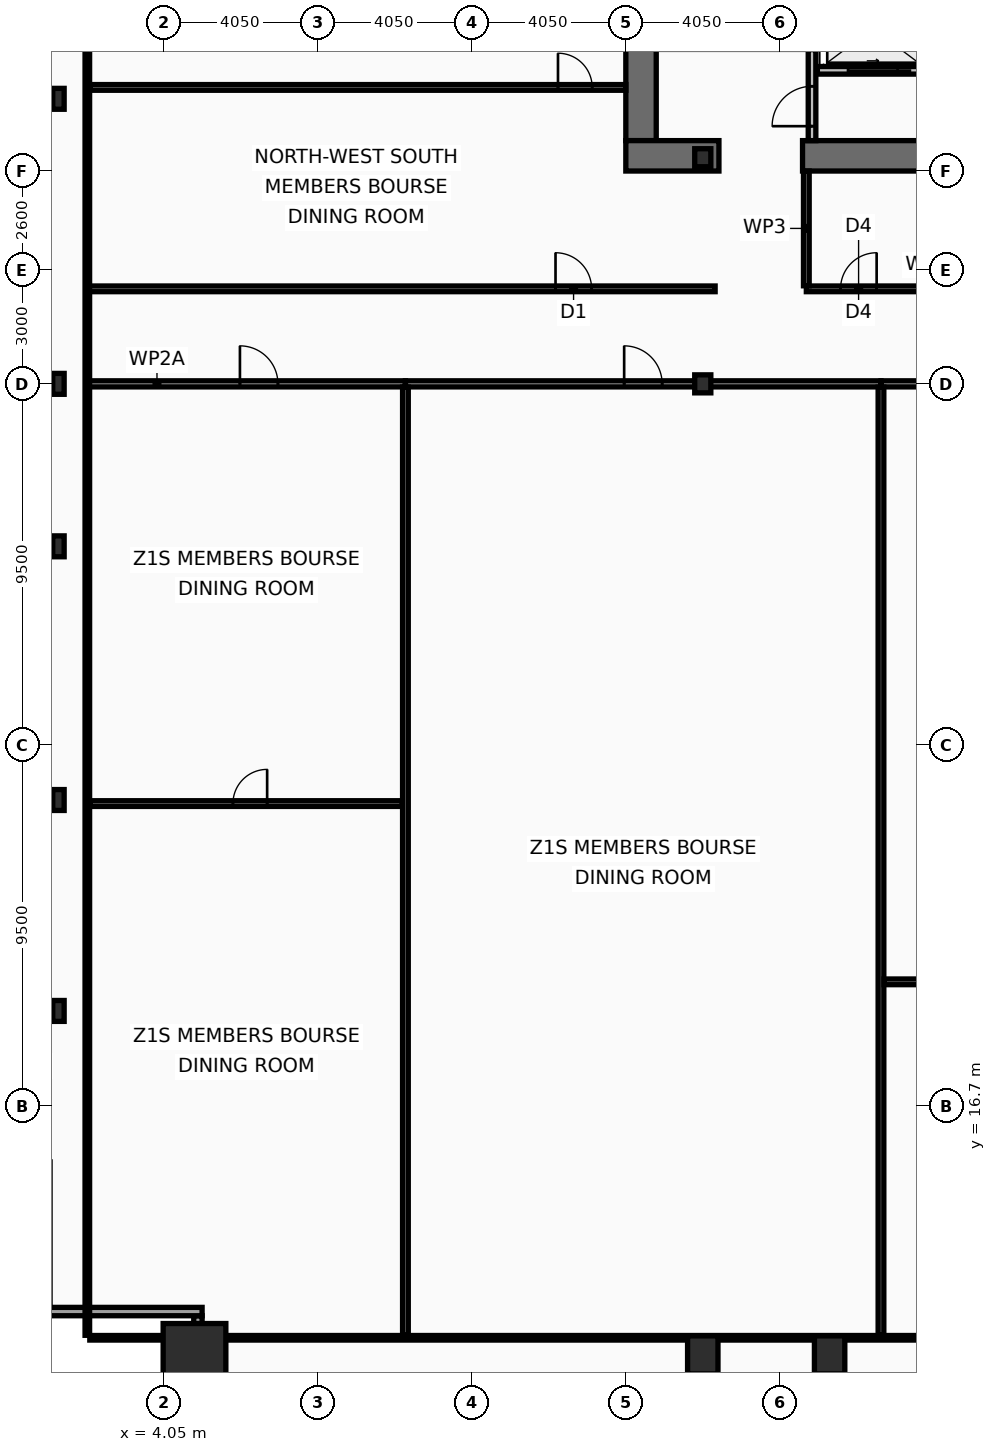
"""IFC4 building model, lengths in metres.
Left out: names, types, materials, properties, quantities, classifications, styles, units other than length and angle.
Written with IfcOpenShell. Run it as: python <this file> out.ifc"""

import sys

from ifc_helpers import new_model, si_unit, direction, frame, frame_2d, origin, origin_2d, place, context, subcontext, project, spatial, rectangle, hollow_rectangle, i_section, extrude, element, fill, save


model = new_model("IFC4")
c1 = context("Model", 3, precision=1e-05, world=origin(), true_north=direction((0.0, 1.0)))
c2 = subcontext(c1, "Body", "Model", "MODEL_VIEW")
j1 = project(units=[si_unit("LENGTHUNIT", "METRE"), si_unit("PLANEANGLEUNIT", "RADIAN")], contexts=[c1])
p1 = place(None, origin())
s1 = spatial("IfcSite", under=j1, at=p1, CompositionType="ELEMENT")
p2 = place(p1, origin())
s2 = spatial("IfcBuilding", under=s1, at=p2, CompositionType="ELEMENT")
p3 = place(p2, frame((0.0, 0.0, 45.8)))
s3 = spatial("IfcBuildingStorey", under=s2, at=p3, CompositionType="ELEMENT", Elevation=45.8)
p4 = place(p3, frame((16.6, 42.1, 0.0), z_axis=(0.0, 0.0, 1.0), x_axis=(0.0, 1.0, 0.0)))
e1 = element("IfcWall", 1, at=p4, inside=s3, PredefinedType="SHEAR", context=c2, shape_type="SweptSolid", body=[
    extrude(rectangle(XDim=10.8, YDim=0.8, at=frame_2d((5.4, 0.0))), origin(), (0.0, 0.0, 1.0), 3.82),
])
p5 = place(p3, frame((18.65, 41.7, 0.0), z_axis=(0.0, 0.0, 1.0), x_axis=(-1.0, 0.0, 0.0)))
e2 = element("IfcWall", 2, at=p5, inside=s3, PredefinedType="SHEAR", context=c2, shape_type="SweptSolid", body=[
    extrude(rectangle(XDim=2.45, YDim=0.8, at=frame_2d((1.225, 0.0))), origin(), (0.0, 0.0, 1.0), 3.82),
])
p6 = place(p3, frame((32.3, 41.7, 0.0), z_axis=(0.0, 0.0, 1.0), x_axis=(-1.0, 0.0, 0.0)))
e3 = element("IfcWall", 3, at=p6, inside=s3, PredefinedType="SHEAR", context=c2, shape_type="SweptSolid", body=[
    extrude(rectangle(XDim=11.45, YDim=0.8, at=frame_2d((5.725, 0.0))), origin(), (0.0, 0.0, 1.0), 3.82),
])
p7 = place(p3, frame((4.85, 10.15, 0.0), z_axis=(0.0, 0.0, 1.0), x_axis=(1.0, 0.0, 0.0)))
e4 = element("IfcColumn", 4, at=p7, inside=s3, PredefinedType="COLUMN", context=c2, shape_type="SweptSolid", body=[
    extrude(hollow_rectangle(XDim=1.65, YDim=1.65, WallThickness=0.075, at=origin_2d()), origin(), (0.0, 0.0, 1.0), 4.0),
])
for number, where, z_axis, x_axis in (
    (5, (18.225, 10.15, 0.0), (0.0, 0.0, 1.0), (1.0, 0.0, 0.0)),
    (6, (21.562, 10.15, 0.0), (0.0, 0.0, 1.0), (1.0, 0.0, 0.0)),
):
    element("IfcColumn", number, at=place(p3, frame(where, z_axis=z_axis, x_axis=x_axis)), inside=s3, PredefinedType="COLUMN", context=c2, shape_type="SweptSolid", body=[
        extrude(hollow_rectangle(XDim=0.8, YDim=1.0, WallThickness=0.055, at=origin_2d()), origin(), (0.0, 0.0, 1.0), 4.0),
    ])
for number, where, z_axis, x_axis in (
    (7, (1.27, 19.2, 0.0), (0.0, 0.0, 1.0), (1.0, 0.0, 0.0)),
    (8, (1.27, 24.75, 0.0), (0.0, 0.0, 1.0), (1.0, 0.0, 0.0)),
    (9, (1.27, 31.425, 0.0), (0.0, 0.0, 1.0), (1.0, 0.0, 0.0)),
    (10, (1.27, 35.7, 0.0), (0.0, 0.0, 1.0), (1.0, 0.0, 0.0)),
    (11, (1.27, 43.2, 0.0), (0.0, 0.0, 1.0), (1.0, 0.0, 0.0)),
):
    element("IfcColumn", number, at=place(p3, frame(where, z_axis=z_axis, x_axis=x_axis)), inside=s3, PredefinedType="COLUMN", context=c2, shape_type="SweptSolid", body=[
        extrude(i_section(OverallWidth=0.3, OverallDepth=0.55, WebThickness=0.015, FlangeThickness=0.029, at=origin_2d()), origin(), (0.0, 0.0, 1.0), 4.0),
    ])
for number, where, z_axis, x_axis in (
    (12, (18.225, 35.7, 0.0), (0.0, 0.0, 1.0), (1.0, 0.0, 0.0)),
    (13, (18.225, 41.65, 0.0), (0.0, 0.0, 1.0), (1.0, 0.0, 0.0)),
):
    element("IfcColumn", number, at=place(p3, frame(where, z_axis=z_axis, x_axis=x_axis)), inside=s3, PredefinedType="COLUMN", context=c2, shape_type="SweptSolid", body=[
        extrude(i_section(OverallWidth=0.424, OverallDepth=0.474, WebThickness=0.048, FlangeThickness=0.077, at=origin_2d()), origin(), (0.0, 0.0, 1.0), 4.0),
    ])
p8 = place(p3, frame((4.94, 7.27, 0.0), z_axis=(0.0, 0.0, 1.0), x_axis=(0.0, 1.0, 0.0)))
e14 = element("IfcWall", 14, at=p8, inside=s3, PredefinedType="SOLIDWALL", context=c2, shape_type="SweptSolid", body=[
    extrude(rectangle(XDim=3.91, YDim=0.22, at=frame_2d((1.955, 0.0))), origin(), (0.0, 0.0, 1.0), 3.16),
])
p9 = place(p3, frame((5.05, 11.29, 0.0), z_axis=(0.0, 0.0, 1.0), x_axis=(-1.0, 0.0, 0.0)))
e15 = element("IfcWall", 15, at=p9, inside=s3, PredefinedType="SOLIDWALL", context=c2, shape_type="SweptSolid", body=[
    extrude(rectangle(XDim=4.22, YDim=0.22, at=frame_2d((2.11, 0.0))), origin(), (0.0, 0.0, 1.0), 3.16),
])
p10 = place(p3, frame((24.21, 43.95, 0.0), z_axis=(0.0, 0.0, 1.0), x_axis=(-1.0, 0.0, 0.0)))
e16 = element("IfcWall", 16, at=p10, inside=s3, PredefinedType="PARTITIONING", context=c2, shape_type="SweptSolid", body=[
    extrude(rectangle(XDim=2.97, YDim=0.2, at=frame_2d((1.485, 0.0))), origin(), (0.0, 0.0, 1.0), 3.82),
])
p11 = place(p10, frame((0.86, 0.0, 0.0)))
e17 = element("IfcOpeningElement", 17, at=p11, cuts=e16, PredefinedType="OPENING", context=c2, shape_type="SweptSolid", body=[
    extrude(rectangle(XDim=1.3, YDim=2.18, at=frame_2d((0.65, 1.09))), frame((0.0, 0.11, 0.0), z_axis=(0.0, -1.0, 0.0), x_axis=(1.0, 0.0, 0.0)), (0.0, 0.0, 1.0), 0.22),
])
p12 = place(p3, frame((21.1, 42.1, 0.0), z_axis=(0.0, 0.0, 1.0), x_axis=(0.0, 1.0, 0.0)))
e18 = element("IfcWall", 18, at=p12, inside=s3, PredefinedType="PARTITIONING", context=c2, shape_type="SweptSolid", body=[
    extrude(rectangle(XDim=2.395, YDim=0.2, at=frame_2d((1.198, 0.0))), origin(), (0.0, 0.0, 1.0), 3.82),
])
p13 = place(p12, frame((0.38, 0.0, 0.0)))
e19 = element("IfcOpeningElement", 19, at=p13, cuts=e18, PredefinedType="OPENING", context=c2, shape_type="SweptSolid", body=[
    extrude(rectangle(XDim=1.05, YDim=2.15, at=frame_2d((0.525, 1.075))), frame((0.0, 0.11, 0.0), z_axis=(0.0, -1.0, 0.0), x_axis=(1.0, 0.0, 0.0)), (0.0, 0.0, 1.0), 0.22),
])
p14 = place(p3, frame((20.95, 38.2, 0.0), z_axis=(0.0, 0.0, 1.0), x_axis=(1.0, 0.0, 0.0)))
e20 = element("IfcWall", 20, at=p14, inside=s3, PredefinedType="PARTITIONING", context=c2, shape_type="SweptSolid", body=[
    extrude(rectangle(XDim=4.15, YDim=0.15, at=frame_2d((2.075, 0.0))), origin(), (0.0, 0.0, 1.0), 3.01),
])
p15 = place(p14, frame((0.9, 0.0, 0.0)))
e21 = element("IfcOpeningElement", 21, at=p15, cuts=e20, PredefinedType="OPENING", context=c2, shape_type="SweptSolid", body=[
    extrude(rectangle(XDim=0.95, YDim=2.05, at=frame_2d((0.475, 1.025))), frame((0.0, 0.085, 0.0), z_axis=(0.0, -1.0, 0.0), x_axis=(1.0, 0.0, 0.0)), (0.0, 0.0, 1.0), 0.17),
])
p16 = place(p3, frame((20.95, 38.28, 0.0), z_axis=(0.0, 0.0, 1.0), x_axis=(0.0, 1.0, 0.0)))
e22 = element("IfcWall", 22, at=p16, inside=s3, PredefinedType="PARTITIONING", context=c2, shape_type="SweptSolid", body=[
    extrude(rectangle(XDim=3.02, YDim=0.15, at=frame_2d((1.51, 0.0))), origin(), (0.0, 0.0, 1.0), 3.82),
])
p17 = place(p3, frame((2.03, 38.2, 0.0), z_axis=(0.0, 0.0, 1.0), x_axis=(1.0, 0.0, 0.0)))
e23 = element("IfcWall", 23, at=p17, inside=s3, PredefinedType="PARTITIONING", context=c2, shape_type="SweptSolid", body=[
    extrude(rectangle(XDim=16.52, YDim=0.15, at=frame_2d((8.26, 0.0))), origin(), (0.0, 0.0, 1.0), 3.01),
])
p18 = place(p17, frame((12.32, 0.0, 0.0)))
e24 = element("IfcOpeningElement", 24, at=p18, cuts=e23, PredefinedType="OPENING", context=c2, shape_type="SweptSolid", body=[
    extrude(rectangle(XDim=0.95, YDim=2.05, at=frame_2d((0.475, 1.025))), frame((0.0, 0.085, 0.0), z_axis=(0.0, -1.0, 0.0), x_axis=(1.0, 0.0, 0.0)), (0.0, 0.0, 1.0), 0.17),
])
p19 = place(p3, frame((2.095, 43.5, 0.0), z_axis=(0.0, 0.0, 1.0), x_axis=(1.0, 0.0, 0.0)))
e25 = element("IfcWall", 25, at=p19, inside=s3, PredefinedType="PARTITIONING", context=c2, shape_type="SweptSolid", body=[
    extrude(rectangle(XDim=14.105, YDim=0.15, at=frame_2d((7.052, 0.0))), origin(), (0.0, 0.0, 1.0), 3.01),
])
p20 = place(p19, frame((12.32, 0.0, 0.0)))
e26 = element("IfcOpeningElement", 26, at=p20, cuts=e25, PredefinedType="OPENING", context=c2, shape_type="SweptSolid", body=[
    extrude(rectangle(XDim=0.9, YDim=2.05, at=frame_2d((0.45, 1.025))), frame((0.0, 0.085, 0.0), z_axis=(0.0, -1.0, 0.0), x_axis=(1.0, 0.0, 0.0)), (0.0, 0.0, 1.0), 0.17),
])
p21 = place(p3, frame((2.03, 35.7, 0.0), z_axis=(0.0, 0.0, 1.0), x_axis=(1.0, 0.0, 0.0)))
e27 = element("IfcWall", 27, at=p21, inside=s3, PredefinedType="PARTITIONING", context=c2, shape_type="SweptSolid", body=[
    extrude(rectangle(XDim=8.37, YDim=0.16, at=frame_2d((4.185, 0.0))), origin(), (0.0, 0.0, 1.0), 3.01),
])
p22 = place(p21, frame((4.016, 0.0, 0.0)))
e28 = element("IfcOpeningElement", 28, at=p22, cuts=e27, PredefinedType="OPENING", context=c2, shape_type="SweptSolid", body=[
    extrude(rectangle(XDim=1.0, YDim=2.05, at=frame_2d((0.5, 1.025))), frame((0.0, 0.09, 0.0), z_axis=(0.0, -1.0, 0.0), x_axis=(1.0, 0.0, 0.0)), (0.0, 0.0, 1.0), 0.18),
])
p23 = place(p3, frame((2.095, 24.656, 0.0), z_axis=(0.0, 0.0, 1.0), x_axis=(1.0, 0.0, 0.0)))
e29 = element("IfcWall", 29, at=p23, inside=s3, PredefinedType="PARTITIONING", context=c2, shape_type="SweptSolid", body=[
    extrude(rectangle(XDim=8.225, YDim=0.15, at=frame_2d((4.113, 0.0))), origin(), (0.0, 0.0, 1.0), 3.82),
])
p24 = place(p23, frame((3.767, 0.0, 0.0)))
e30 = element("IfcOpeningElement", 30, at=p24, cuts=e29, PredefinedType="OPENING", context=c2, shape_type="SweptSolid", body=[
    extrude(rectangle(XDim=0.9, YDim=2.05, at=frame_2d((0.45, 1.025))), frame((0.0, 0.085, 0.0), z_axis=(0.0, -1.0, 0.0), x_axis=(1.0, 0.0, 0.0)), (0.0, 0.0, 1.0), 0.17),
])
p25 = place(p3, frame((10.4, 35.7, 0.0), z_axis=(0.0, 0.0, 1.0), x_axis=(1.0, 0.0, 0.0)))
e31 = element("IfcWall", 31, at=p25, inside=s3, PredefinedType="PARTITIONING", context=c2, shape_type="SweptSolid", body=[
    extrude(rectangle(XDim=12.514, YDim=0.16, at=frame_2d((6.257, 0.0))), origin(), (0.0, 0.0, 1.0), 3.01),
])
p26 = place(p25, frame((5.756, 0.0, 0.0)))
e32 = element("IfcOpeningElement", 32, at=p26, cuts=e31, PredefinedType="OPENING", context=c2, shape_type="SweptSolid", body=[
    extrude(rectangle(XDim=1.0, YDim=2.05, at=frame_2d((0.5, 1.025))), frame((0.0, 0.09, 0.0), z_axis=(0.0, -1.0, 0.0), x_axis=(1.0, 0.0, 0.0)), (0.0, 0.0, 1.0), 0.18),
])
p27 = place(p3, frame((10.4, 10.665, 0.0), z_axis=(0.0, 0.0, 1.0), x_axis=(0.0, 1.0, 0.0)))
e33 = element("IfcWall", 33, at=p27, inside=s3, PredefinedType="PARTITIONING", context=c2, shape_type="SweptSolid", body=[
    extrude(rectangle(XDim=24.95, YDim=0.15, at=frame_2d((12.475, 0.0))), origin(), (0.0, 0.0, 1.0), 3.01),
])
p28 = place(p3, frame((22.914, 35.7, 0.0), z_axis=(0.0, 0.0, 1.0), x_axis=(1.0, 0.0, 0.0)))
e34 = element("IfcWall", 34, at=p28, inside=s3, PredefinedType="PARTITIONING", context=c2, shape_type="SweptSolid", body=[
    extrude(rectangle(XDim=12.681, YDim=0.16, at=frame_2d((6.34, 0.0))), origin(), (0.0, 0.0, 1.0), 3.01),
])
p29 = place(p28, frame((5.826, 0.0, 0.0)))
e35 = element("IfcOpeningElement", 35, at=p29, cuts=e34, PredefinedType="OPENING", context=c2, shape_type="SweptSolid", body=[
    extrude(rectangle(XDim=1.0, YDim=2.05, at=frame_2d((0.5, 1.025))), frame((0.0, 0.09, 0.0), z_axis=(0.0, -1.0, 0.0), x_axis=(1.0, 0.0, 0.0)), (0.0, 0.0, 1.0), 0.18),
])
p30 = place(p3, frame((22.914, 10.665, 0.0), z_axis=(0.0, 0.0, 1.0), x_axis=(0.0, 1.0, 0.0)))
e36 = element("IfcWall", 36, at=p30, inside=s3, PredefinedType="PARTITIONING", context=c2, shape_type="SweptSolid", body=[
    extrude(rectangle(XDim=24.95, YDim=0.15, at=frame_2d((12.475, 0.0))), origin(), (0.0, 0.0, 1.0), 3.21),
])
p31 = place(p3, frame((22.994, 19.966, 0.0), z_axis=(0.0, 0.0, 1.0), x_axis=(1.0, 0.0, 0.0)))
e37 = element("IfcWall", 37, at=p31, inside=s3, PredefinedType="PARTITIONING", context=c2, shape_type="SweptSolid", body=[
    extrude(rectangle(XDim=12.521, YDim=0.15, at=frame_2d((6.26, 0.0))), origin(), (0.0, 0.0, 1.0), 3.01),
])
p32 = place(p31, frame((5.706, 0.0, 0.0)))
e38 = element("IfcOpeningElement", 38, at=p32, cuts=e37, PredefinedType="OPENING", context=c2, shape_type="SweptSolid", body=[
    extrude(rectangle(XDim=0.9, YDim=2.05, at=frame_2d((0.45, 1.025))), frame((0.0, 0.085, 0.0), z_axis=(0.0, -1.0, 0.0), x_axis=(1.0, 0.0, 0.0)), (0.0, 0.0, 1.0), 0.17),
])
p33 = place(p3, frame((2.03, 10.665, 0.0), z_axis=(0.0, 0.0, 1.0), x_axis=(0.0, 1.0, 0.0)))
e39 = element("IfcWall", 39, at=p33, inside=s3, PredefinedType="PARTITIONING", context=c2, shape_type="SweptSolid", body=[
    extrude(rectangle(XDim=42.11, YDim=0.12, at=frame_2d((21.055, 0.0))), origin(), (0.0, 0.0, 1.0), 3.01),
])
p34 = place(p3, frame((2.095, 10.6, 0.0), z_axis=(0.0, 0.0, 1.0), x_axis=(1.0, 0.0, 0.0)))
e40 = element("IfcWall", 40, at=p34, inside=s3, PredefinedType="PARTITIONING", context=c2, shape_type="SweptSolid", body=[
    extrude(rectangle(XDim=68.71, YDim=0.12, at=frame_2d((34.355, 0.0))), origin(), (0.0, 0.0, 1.0), 3.01),
])
p35 = place(p11, origin())
e41 = element("IfcDoor", 41, at=p35, inside=s3, OperationType="SLIDING_TO_LEFT", PredefinedType="DOOR", context=c2, shape_type="SweptSolid", body=[
    extrude(rectangle(XDim=1.3, YDim=2.18, at=frame_2d((0.65, 1.09))), frame((0.0, 0.025, 0.0), z_axis=(0.0, -1.0, 0.0), x_axis=(1.0, 0.0, 0.0)), (0.0, 0.0, 1.0), 0.05),
])
fill(e17, e41)
p36 = place(p13, origin())
e42 = element("IfcDoor", 42, at=p36, inside=s3, OperationType="SINGLE_SWING_LEFT", PredefinedType="DOOR", context=c2, shape_type="SweptSolid", body=[
    extrude(rectangle(XDim=1.05, YDim=2.15, at=frame_2d((0.525, 1.075))), frame((0.0, 0.025, 0.0), z_axis=(0.0, -1.0, 0.0), x_axis=(1.0, 0.0, 0.0)), (0.0, 0.0, 1.0), 0.05),
])
fill(e19, e42)
p37 = place(p15, origin())
e43 = element("IfcDoor", 43, at=p37, inside=s3, OperationType="SINGLE_SWING_RIGHT", PredefinedType="DOOR", context=c2, shape_type="SweptSolid", body=[
    extrude(rectangle(XDim=0.95, YDim=2.05, at=frame_2d((0.475, 1.025))), frame((0.0, 0.025, 0.0), z_axis=(0.0, -1.0, 0.0), x_axis=(1.0, 0.0, 0.0)), (0.0, 0.0, 1.0), 0.05),
])
fill(e21, e43)
p38 = place(p18, origin())
e44 = element("IfcDoor", 44, at=p38, inside=s3, OperationType="SINGLE_SWING_LEFT", PredefinedType="DOOR", context=c2, shape_type="SweptSolid", body=[
    extrude(rectangle(XDim=0.95, YDim=2.05, at=frame_2d((0.475, 1.025))), frame((0.0, 0.025, 0.0), z_axis=(0.0, -1.0, 0.0), x_axis=(1.0, 0.0, 0.0)), (0.0, 0.0, 1.0), 0.05),
])
fill(e24, e44)
p39 = place(p20, origin())
e45 = element("IfcDoor", 45, at=p39, inside=s3, OperationType="SINGLE_SWING_LEFT", PredefinedType="DOOR", context=c2, shape_type="SweptSolid", body=[
    extrude(rectangle(XDim=0.9, YDim=2.05, at=frame_2d((0.45, 1.025))), frame((0.0, 0.025, 0.0), z_axis=(0.0, -1.0, 0.0), x_axis=(1.0, 0.0, 0.0)), (0.0, 0.0, 1.0), 0.05),
])
fill(e26, e45)
p40 = place(p22, origin())
e46 = element("IfcDoor", 46, at=p40, inside=s3, OperationType="SINGLE_SWING_LEFT", PredefinedType="DOOR", context=c2, shape_type="SweptSolid", body=[
    extrude(rectangle(XDim=1.0, YDim=2.05, at=frame_2d((0.5, 1.025))), frame((0.0, 0.025, 0.0), z_axis=(0.0, -1.0, 0.0), x_axis=(1.0, 0.0, 0.0)), (0.0, 0.0, 1.0), 0.05),
])
fill(e28, e46)
p41 = place(p24, origin())
e47 = element("IfcDoor", 47, at=p41, inside=s3, OperationType="SINGLE_SWING_RIGHT", PredefinedType="DOOR", context=c2, shape_type="SweptSolid", body=[
    extrude(rectangle(XDim=0.9, YDim=2.05, at=frame_2d((0.45, 1.025))), frame((0.0, 0.025, 0.0), z_axis=(0.0, -1.0, 0.0), x_axis=(1.0, 0.0, 0.0)), (0.0, 0.0, 1.0), 0.05),
])
fill(e30, e47)
p42 = place(p26, origin())
e48 = element("IfcDoor", 48, at=p42, inside=s3, OperationType="SINGLE_SWING_LEFT", PredefinedType="DOOR", context=c2, shape_type="SweptSolid", body=[
    extrude(rectangle(XDim=1.0, YDim=2.05, at=frame_2d((0.5, 1.025))), frame((0.0, 0.025, 0.0), z_axis=(0.0, -1.0, 0.0), x_axis=(1.0, 0.0, 0.0)), (0.0, 0.0, 1.0), 0.05),
])
fill(e32, e48)
save(model, sys.argv[1])
